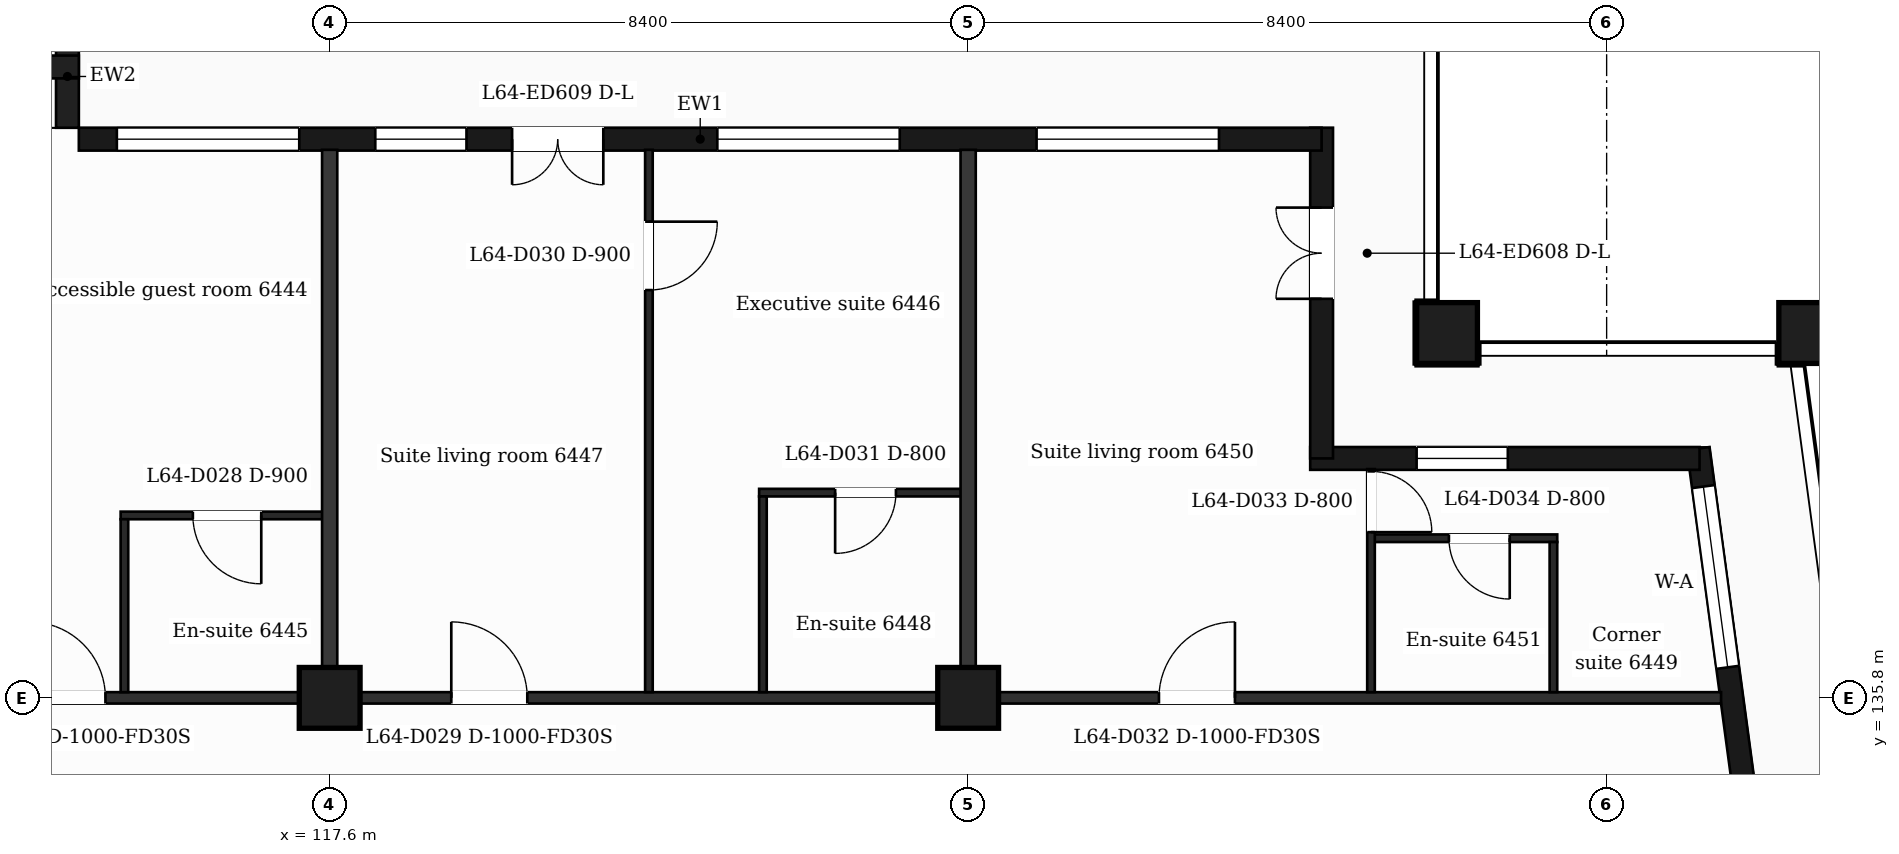
"""IFC4 building model, lengths in metres.
Left out: names, types, materials, properties, quantities, classifications, styles, units other than length and angle.
Written with IfcOpenShell. Run it as: python <this file> out.ifc"""

import sys

from ifc_helpers import new_model, si_unit, direction, frame, frame_2d, origin, origin_2d, place, context, subcontext, project, spatial, rectangle, extrude, element, fill, save


model = new_model("IFC4")
c1 = context("Model", 3, precision=1e-05, world=origin(), true_north=direction((0.0, 1.0)))
c2 = subcontext(c1, "Body", "Model", "MODEL_VIEW")
j1 = project(units=[si_unit("LENGTHUNIT", "METRE"), si_unit("PLANEANGLEUNIT", "RADIAN")], contexts=[c1])
p1 = place(None, origin())
s1 = spatial("IfcSite", under=j1, at=p1, CompositionType="ELEMENT")
p2 = place(p1, origin())
s2 = spatial("IfcBuilding", under=s1, at=p2, CompositionType="ELEMENT")
p3 = place(p2, frame((0.0, 0.0, 266.4)))
s3 = spatial("IfcBuildingStorey", under=s2, at=p3, CompositionType="ELEMENT", Elevation=266.4)
for number, where, z_axis, x_axis in (
    (1, (132.3, 140.6, 0.0), (0.0, 0.0, 1.0), (1.0, 0.0, 0.0)),
    (2, (137.065, 140.6, 0.0), (0.0, 0.0, 1.0), (1.0, 0.0, 0.0)),
    (3, (117.6, 135.8, 0.0), (0.0, 0.0, 1.0), (1.0, 0.0, 0.0)),
    (4, (126.0, 135.8, 0.0), (0.0, 0.0, 1.0), (1.0, 0.0, 0.0)),
):
    element("IfcColumn", number, at=place(p3, frame(where, z_axis=z_axis, x_axis=x_axis)), inside=s3, PredefinedType="COLUMN", context=c2, shape_type="SweptSolid", body=[
        extrude(rectangle(XDim=0.8, YDim=0.8, at=origin_2d()), origin(), (0.0, 0.0, 1.0), 3.7),
    ])
p4 = place(p3, frame((136.504, 132.4, 0.0), z_axis=(0.0, 0.0, 1.0), x_axis=(-0.133399697462, 0.99106231929, 0.0)))
e5 = element("IfcWall", 5, at=p4, inside=s3, PredefinedType="SOLIDWALL", context=c2, shape_type="SweptSolid", body=[
    extrude(rectangle(XDim=6.74, YDim=0.3, at=frame_2d((3.37, 0.0))), origin(), (0.0, 0.0, 1.0), 3.38),
])
p5 = place(p4, frame((1.115, 0.0, 0.0)))
e6 = element("IfcOpeningElement", 6, at=p5, cuts=e5, PredefinedType="OPENING", context=c2, shape_type="SweptSolid", body=[
    extrude(rectangle(XDim=1.2, YDim=2.4, at=frame_2d((0.6, 1.2))), frame((0.0, 0.16, 0.0), z_axis=(0.0, -1.0, 0.0), x_axis=(1.0, 0.0, 0.0)), (0.0, 0.0, 1.0), 0.32),
])
p6 = place(p4, frame((3.835, 0.0, 0.9)))
e7 = element("IfcOpeningElement", 7, at=p6, cuts=e5, PredefinedType="OPENING", context=c2, shape_type="SweptSolid", body=[
    extrude(rectangle(XDim=2.4, YDim=2.1, at=frame_2d((1.2, 1.05))), frame((0.0, 0.16, 0.0), z_axis=(0.0, -1.0, 0.0), x_axis=(1.0, 0.0, 0.0)), (0.0, 0.0, 1.0), 0.32),
])
p7 = place(p3, frame((135.623, 138.95, 0.0), z_axis=(0.0, 0.0, 1.0), x_axis=(-1.0, 0.0, 0.0)))
e8 = element("IfcWall", 8, at=p7, inside=s3, PredefinedType="SOLIDWALL", context=c2, shape_type="SweptSolid", body=[
    extrude(rectangle(XDim=5.123, YDim=0.3, at=frame_2d((2.561, 0.0))), origin(), (0.0, 0.0, 1.0), 3.38),
])
p8 = place(p7, frame((2.523, 0.0, 0.9)))
e9 = element("IfcOpeningElement", 9, at=p8, cuts=e8, PredefinedType="OPENING", context=c2, shape_type="SweptSolid", body=[
    extrude(rectangle(XDim=1.2, YDim=2.1, at=frame_2d((0.6, 1.05))), frame((0.0, 0.16, 0.0), z_axis=(0.0, -1.0, 0.0), x_axis=(1.0, 0.0, 0.0)), (0.0, 0.0, 1.0), 0.32),
])
p9 = place(p3, frame((130.65, 138.95, 0.0), z_axis=(0.0, 0.0, 1.0), x_axis=(0.0, 1.0, 0.0)))
e10 = element("IfcWall", 10, at=p9, inside=s3, PredefinedType="SOLIDWALL", context=c2, shape_type="SweptSolid", body=[
    extrude(rectangle(XDim=4.35, YDim=0.3, at=frame_2d((2.175, 0.0))), origin(), (0.0, 0.0, 1.0), 3.38),
])
p10 = place(p9, frame((2.1, 0.0, 0.0)))
e11 = element("IfcOpeningElement", 11, at=p10, cuts=e10, PredefinedType="OPENING", context=c2, shape_type="SweptSolid", body=[
    extrude(rectangle(XDim=1.2, YDim=2.4, at=frame_2d((0.6, 1.2))), frame((0.0, 0.16, 0.0), z_axis=(0.0, -1.0, 0.0), x_axis=(1.0, 0.0, 0.0)), (0.0, 0.0, 1.0), 0.32),
])
p11 = place(p3, frame((130.65, 143.15, 0.0), z_axis=(0.0, 0.0, 1.0), x_axis=(-1.0, 0.0, 0.0)))
e12 = element("IfcWall", 12, at=p11, inside=s3, PredefinedType="SOLIDWALL", context=c2, shape_type="SweptSolid", body=[
    extrude(rectangle(XDim=16.35, YDim=0.3, at=frame_2d((8.175, 0.0))), origin(), (0.0, 0.0, 1.0), 3.38),
])
p12 = place(p11, frame((1.35, 0.0, 0.9)))
e13 = element("IfcOpeningElement", 13, at=p12, cuts=e12, PredefinedType="OPENING", context=c2, shape_type="SweptSolid", body=[
    extrude(rectangle(XDim=2.4, YDim=2.1, at=frame_2d((1.2, 1.05))), frame((0.0, 0.16, 0.0), z_axis=(0.0, -1.0, 0.0), x_axis=(1.0, 0.0, 0.0)), (0.0, 0.0, 1.0), 0.32),
])
p13 = place(p11, frame((5.55, 0.0, 0.9)))
e14 = element("IfcOpeningElement", 14, at=p13, cuts=e12, PredefinedType="OPENING", context=c2, shape_type="SweptSolid", body=[
    extrude(rectangle(XDim=2.4, YDim=2.1, at=frame_2d((1.2, 1.05))), frame((0.0, 0.16, 0.0), z_axis=(0.0, -1.0, 0.0), x_axis=(1.0, 0.0, 0.0)), (0.0, 0.0, 1.0), 0.32),
])
p14 = place(p11, frame((9.45, 0.0, 0.0)))
e15 = element("IfcOpeningElement", 15, at=p14, cuts=e12, PredefinedType="OPENING", context=c2, shape_type="SweptSolid", body=[
    extrude(rectangle(XDim=1.2, YDim=2.4, at=frame_2d((0.6, 1.2))), frame((0.0, 0.16, 0.0), z_axis=(0.0, -1.0, 0.0), x_axis=(1.0, 0.0, 0.0)), (0.0, 0.0, 1.0), 0.32),
])
p15 = place(p11, frame((11.25, 0.0, 0.9)))
e16 = element("IfcOpeningElement", 16, at=p15, cuts=e12, PredefinedType="OPENING", context=c2, shape_type="SweptSolid", body=[
    extrude(rectangle(XDim=1.2, YDim=2.1, at=frame_2d((0.6, 1.05))), frame((0.0, 0.16, 0.0), z_axis=(0.0, -1.0, 0.0), x_axis=(1.0, 0.0, 0.0)), (0.0, 0.0, 1.0), 0.32),
])
p16 = place(p11, frame((13.45, 0.0, 0.9)))
e17 = element("IfcOpeningElement", 17, at=p16, cuts=e12, PredefinedType="OPENING", context=c2, shape_type="SweptSolid", body=[
    extrude(rectangle(XDim=2.4, YDim=2.1, at=frame_2d((1.2, 1.05))), frame((0.0, 0.16, 0.0), z_axis=(0.0, -1.0, 0.0), x_axis=(1.0, 0.0, 0.0)), (0.0, 0.0, 1.0), 0.32),
])
p17 = place(p3, frame((114.15, 143.3, 0.0), z_axis=(0.0, 0.0, 1.0), x_axis=(0.0, 1.0, 0.0)))
e18 = element("IfcWall", 18, at=p17, inside=s3, PredefinedType="SOLIDWALL", context=c2, shape_type="SweptSolid", body=[
    extrude(rectangle(XDim=1.35, YDim=0.3, at=frame_2d((0.675, 0.0))), origin(), (0.0, 0.0, 1.0), 3.38),
])
p18 = place(p3, frame((114.3, 144.1, 0.0), z_axis=(0.0, 0.0, 1.0), x_axis=(-1.0, 0.0, 0.0)))
e19 = element("IfcWall", 19, at=p18, inside=s3, PredefinedType="SOLIDWALL", context=c2, shape_type="SweptSolid", body=[
    extrude(rectangle(XDim=3.9, YDim=0.3, at=frame_2d((1.95, 0.0))), origin(), (0.0, 0.0, 1.0), 3.38),
])
p19 = place(p18, frame((1.35, 0.0, 0.0)))
e20 = element("IfcOpeningElement", 20, at=p19, cuts=e19, PredefinedType="OPENING", context=c2, shape_type="SweptSolid", body=[
    extrude(rectangle(XDim=1.2, YDim=2.4, at=frame_2d((0.6, 1.2))), frame((0.0, 0.16, 0.0), z_axis=(0.0, -1.0, 0.0), x_axis=(1.0, 0.0, 0.0)), (0.0, 0.0, 1.0), 0.32),
])
p20 = place(p3, frame((90.895, 135.8, 0.0), z_axis=(0.0, 0.0, 1.0), x_axis=(1.0, 0.0, 0.0)))
e21 = element("IfcWall", 21, at=p20, inside=s3, PredefinedType="PARTITIONING", context=c2, shape_type="SweptSolid", body=[
    extrude(rectangle(XDim=45.011, YDim=0.15, at=frame_2d((22.505, 0.0))), origin(), (0.0, 0.0, 1.0), 3.38),
])
p21 = place(p20, frame((8.005, 0.0, 0.0)))
e22 = element("IfcOpeningElement", 22, at=p21, cuts=e21, PredefinedType="OPENING", context=c2, shape_type="SweptSolid", body=[
    extrude(rectangle(XDim=1.0, YDim=2.1, at=frame_2d((0.5, 1.05))), frame((0.0, 0.085, 0.0), z_axis=(0.0, -1.0, 0.0), x_axis=(1.0, 0.0, 0.0)), (0.0, 0.0, 1.0), 0.17),
])
p22 = place(p20, frame((11.93, 0.0, 0.0)))
e23 = element("IfcOpeningElement", 23, at=p22, cuts=e21, PredefinedType="OPENING", context=c2, shape_type="SweptSolid", body=[
    extrude(rectangle(XDim=1.0, YDim=2.1, at=frame_2d((0.5, 1.05))), frame((0.0, 0.085, 0.0), z_axis=(0.0, -1.0, 0.0), x_axis=(1.0, 0.0, 0.0)), (0.0, 0.0, 1.0), 0.17),
])
p23 = place(p20, frame((22.755, 0.0, 0.0)))
e24 = element("IfcOpeningElement", 24, at=p23, cuts=e21, PredefinedType="OPENING", context=c2, shape_type="SweptSolid", body=[
    extrude(rectangle(XDim=1.0, YDim=2.1, at=frame_2d((0.5, 1.05))), frame((0.0, 0.085, 0.0), z_axis=(0.0, -1.0, 0.0), x_axis=(1.0, 0.0, 0.0)), (0.0, 0.0, 1.0), 0.17),
])
p24 = place(p20, frame((28.305, 0.0, 0.0)))
e25 = element("IfcOpeningElement", 25, at=p24, cuts=e21, PredefinedType="OPENING", context=c2, shape_type="SweptSolid", body=[
    extrude(rectangle(XDim=1.0, YDim=2.1, at=frame_2d((0.5, 1.05))), frame((0.0, 0.085, 0.0), z_axis=(0.0, -1.0, 0.0), x_axis=(1.0, 0.0, 0.0)), (0.0, 0.0, 1.0), 0.17),
])
p25 = place(p20, frame((37.615, 0.0, 0.0)))
e26 = element("IfcOpeningElement", 26, at=p25, cuts=e21, PredefinedType="OPENING", context=c2, shape_type="SweptSolid", body=[
    extrude(rectangle(XDim=1.0, YDim=2.1, at=frame_2d((0.5, 1.05))), frame((0.0, 0.085, 0.0), z_axis=(0.0, -1.0, 0.0), x_axis=(1.0, 0.0, 0.0)), (0.0, 0.0, 1.0), 0.17),
])
p26 = place(p3, frame((131.3, 137.9, 0.0), z_axis=(0.0, 0.0, 1.0), x_axis=(1.0, 0.0, 0.0)))
e27 = element("IfcWall", 27, at=p26, inside=s3, PredefinedType="PARTITIONING", context=c2, shape_type="SweptSolid", body=[
    extrude(rectangle(XDim=2.45, YDim=0.1, at=frame_2d((1.225, 0.0))), origin(), (0.0, 0.0, 1.0), 3.38),
])
p27 = place(p26, frame((1.025, 0.0, 0.0)))
e28 = element("IfcOpeningElement", 28, at=p27, cuts=e27, PredefinedType="OPENING", context=c2, shape_type="SweptSolid", body=[
    extrude(rectangle(XDim=0.8, YDim=2.1, at=frame_2d((0.4, 1.05))), frame((0.0, 0.06, 0.0), z_axis=(0.0, -1.0, 0.0), x_axis=(1.0, 0.0, 0.0)), (0.0, 0.0, 1.0), 0.12),
])
p28 = place(p3, frame((114.85, 138.2, 0.0), z_axis=(0.0, 0.0, 1.0), x_axis=(1.0, 0.0, 0.0)))
e29 = element("IfcWall", 29, at=p28, inside=s3, PredefinedType="PARTITIONING", context=c2, shape_type="SweptSolid", body=[
    extrude(rectangle(XDim=2.75, YDim=0.1, at=frame_2d((1.375, 0.0))), origin(), (0.0, 0.0, 1.0), 3.38),
])
p29 = place(p28, frame((0.95, 0.0, 0.0)))
e30 = element("IfcOpeningElement", 30, at=p29, cuts=e29, PredefinedType="OPENING", context=c2, shape_type="SweptSolid", body=[
    extrude(rectangle(XDim=0.9, YDim=2.1, at=frame_2d((0.45, 1.05))), frame((0.0, 0.06, 0.0), z_axis=(0.0, -1.0, 0.0), x_axis=(1.0, 0.0, 0.0)), (0.0, 0.0, 1.0), 0.12),
])
p30 = place(p3, frame((123.25, 138.5, 0.0), z_axis=(0.0, 0.0, 1.0), x_axis=(1.0, 0.0, 0.0)))
e31 = element("IfcWall", 31, at=p30, inside=s3, PredefinedType="PARTITIONING", context=c2, shape_type="SweptSolid", body=[
    extrude(rectangle(XDim=2.75, YDim=0.1, at=frame_2d((1.375, 0.0))), origin(), (0.0, 0.0, 1.0), 3.38),
])
p31 = place(p30, frame((1.0, 0.0, 0.0)))
e32 = element("IfcOpeningElement", 32, at=p31, cuts=e31, PredefinedType="OPENING", context=c2, shape_type="SweptSolid", body=[
    extrude(rectangle(XDim=0.8, YDim=2.1, at=frame_2d((0.4, 1.05))), frame((0.0, 0.06, 0.0), z_axis=(0.0, -1.0, 0.0), x_axis=(1.0, 0.0, 0.0)), (0.0, 0.0, 1.0), 0.12),
])
p32 = place(p3, frame((114.9, 135.875, 0.0), z_axis=(0.0, 0.0, 1.0), x_axis=(0.0, 1.0, 0.0)))
e33 = element("IfcWall", 33, at=p32, inside=s3, PredefinedType="PARTITIONING", context=c2, shape_type="SweptSolid", body=[
    extrude(rectangle(XDim=2.275, YDim=0.1, at=frame_2d((1.137, 0.0))), origin(), (0.0, 0.0, 1.0), 3.38),
])
p33 = place(p3, frame((117.6, 135.875, 0.0), z_axis=(0.0, 0.0, 1.0), x_axis=(0.0, 1.0, 0.0)))
e34 = element("IfcWall", 34, at=p33, inside=s3, PredefinedType="PARTITIONING", context=c2, shape_type="SweptSolid", body=[
    extrude(rectangle(XDim=7.135, YDim=0.2, at=frame_2d((3.567, 0.0))), origin(), (0.0, 0.0, 1.0), 3.38),
])
p34 = place(p3, frame((121.8, 135.875, 0.0), z_axis=(0.0, 0.0, 1.0), x_axis=(0.0, 1.0, 0.0)))
e35 = element("IfcWall", 35, at=p34, inside=s3, PredefinedType="PARTITIONING", context=c2, shape_type="SweptSolid", body=[
    extrude(rectangle(XDim=7.135, YDim=0.1, at=frame_2d((3.567, 0.0))), origin(), (0.0, 0.0, 1.0), 3.38),
])
p35 = place(p34, frame((5.29, 0.0, 0.0)))
e36 = element("IfcOpeningElement", 36, at=p35, cuts=e35, PredefinedType="OPENING", context=c2, shape_type="SweptSolid", body=[
    extrude(rectangle(XDim=0.9, YDim=2.1, at=frame_2d((0.45, 1.05))), frame((0.0, 0.06, 0.0), z_axis=(0.0, -1.0, 0.0), x_axis=(1.0, 0.0, 0.0)), (0.0, 0.0, 1.0), 0.12),
])
p36 = place(p3, frame((123.3, 135.875, 0.0), z_axis=(0.0, 0.0, 1.0), x_axis=(0.0, 1.0, 0.0)))
e37 = element("IfcWall", 37, at=p36, inside=s3, PredefinedType="PARTITIONING", context=c2, shape_type="SweptSolid", body=[
    extrude(rectangle(XDim=2.575, YDim=0.1, at=frame_2d((1.288, 0.0))), origin(), (0.0, 0.0, 1.0), 3.38),
])
p37 = place(p3, frame((126.0, 135.875, 0.0), z_axis=(0.0, 0.0, 1.0), x_axis=(0.0, 1.0, 0.0)))
e38 = element("IfcWall", 38, at=p37, inside=s3, PredefinedType="PARTITIONING", context=c2, shape_type="SweptSolid", body=[
    extrude(rectangle(XDim=7.135, YDim=0.2, at=frame_2d((3.567, 0.0))), origin(), (0.0, 0.0, 1.0), 3.38),
])
p38 = place(p3, frame((131.3, 135.875, 0.0), z_axis=(0.0, 0.0, 1.0), x_axis=(0.0, 1.0, 0.0)))
e39 = element("IfcWall", 39, at=p38, inside=s3, PredefinedType="PARTITIONING", context=c2, shape_type="SweptSolid", body=[
    extrude(rectangle(XDim=2.935, YDim=0.1, at=frame_2d((1.468, 0.0))), origin(), (0.0, 0.0, 1.0), 3.38),
])
p39 = place(p38, frame((2.105, 0.0, 0.0)))
e40 = element("IfcOpeningElement", 40, at=p39, cuts=e39, PredefinedType="OPENING", context=c2, shape_type="SweptSolid", body=[
    extrude(rectangle(XDim=0.8, YDim=2.1, at=frame_2d((0.4, 1.05))), frame((0.0, 0.06, 0.0), z_axis=(0.0, -1.0, 0.0), x_axis=(1.0, 0.0, 0.0)), (0.0, 0.0, 1.0), 0.12),
])
p40 = place(p3, frame((133.7, 135.875, 0.0), z_axis=(0.0, 0.0, 1.0), x_axis=(0.0, 1.0, 0.0)))
e41 = element("IfcWall", 41, at=p40, inside=s3, PredefinedType="PARTITIONING", context=c2, shape_type="SweptSolid", body=[
    extrude(rectangle(XDim=1.975, YDim=0.1, at=frame_2d((0.988, 0.0))), origin(), (0.0, 0.0, 1.0), 3.38),
])
p41 = place(p6, origin())
e42 = element("IfcWindow", 42, at=p41, inside=s3, PartitioningType="SINGLE_PANEL", PredefinedType="WINDOW", context=c2, shape_type="SweptSolid", body=[
    extrude(rectangle(XDim=2.4, YDim=2.1, at=frame_2d((1.2, 1.05))), frame((0.0, 0.03, 0.0), z_axis=(0.0, -1.0, 0.0), x_axis=(1.0, 0.0, 0.0)), (0.0, 0.0, 1.0), 0.06),
])
fill(e7, e42)
p42 = place(p8, origin())
e43 = element("IfcWindow", 43, at=p42, inside=s3, PartitioningType="SINGLE_PANEL", PredefinedType="WINDOW", context=c2, shape_type="SweptSolid", body=[
    extrude(rectangle(XDim=1.2, YDim=2.1, at=frame_2d((0.6, 1.05))), frame((0.0, 0.03, 0.0), z_axis=(0.0, -1.0, 0.0), x_axis=(1.0, 0.0, 0.0)), (0.0, 0.0, 1.0), 0.06),
])
fill(e9, e43)
p43 = place(p10, origin())
e44 = element("IfcDoor", 44, at=p43, inside=s3, OperationType="DOUBLE_DOOR_SINGLE_SWING", PredefinedType="DOOR", context=c2, shape_type="SweptSolid", body=[
    extrude(rectangle(XDim=1.2, YDim=2.4, at=frame_2d((0.6, 1.2))), frame((0.0, 0.025, 0.0), z_axis=(0.0, -1.0, 0.0), x_axis=(1.0, 0.0, 0.0)), (0.0, 0.0, 1.0), 0.05),
])
fill(e11, e44)
p44 = place(p12, origin())
e45 = element("IfcWindow", 45, at=p44, inside=s3, PartitioningType="SINGLE_PANEL", PredefinedType="WINDOW", context=c2, shape_type="SweptSolid", body=[
    extrude(rectangle(XDim=2.4, YDim=2.1, at=frame_2d((1.2, 1.05))), frame((0.0, 0.03, 0.0), z_axis=(0.0, -1.0, 0.0), x_axis=(1.0, 0.0, 0.0)), (0.0, 0.0, 1.0), 0.06),
])
fill(e13, e45)
p45 = place(p13, origin())
e46 = element("IfcWindow", 46, at=p45, inside=s3, PartitioningType="SINGLE_PANEL", PredefinedType="WINDOW", context=c2, shape_type="SweptSolid", body=[
    extrude(rectangle(XDim=2.4, YDim=2.1, at=frame_2d((1.2, 1.05))), frame((0.0, 0.03, 0.0), z_axis=(0.0, -1.0, 0.0), x_axis=(1.0, 0.0, 0.0)), (0.0, 0.0, 1.0), 0.06),
])
fill(e14, e46)
p46 = place(p14, origin())
e47 = element("IfcDoor", 47, at=p46, inside=s3, OperationType="DOUBLE_DOOR_SINGLE_SWING", PredefinedType="DOOR", context=c2, shape_type="SweptSolid", body=[
    extrude(rectangle(XDim=1.2, YDim=2.4, at=frame_2d((0.6, 1.2))), frame((0.0, 0.025, 0.0), z_axis=(0.0, -1.0, 0.0), x_axis=(1.0, 0.0, 0.0)), (0.0, 0.0, 1.0), 0.05),
])
fill(e15, e47)
p47 = place(p15, origin())
e48 = element("IfcWindow", 48, at=p47, inside=s3, PartitioningType="SINGLE_PANEL", PredefinedType="WINDOW", context=c2, shape_type="SweptSolid", body=[
    extrude(rectangle(XDim=1.2, YDim=2.1, at=frame_2d((0.6, 1.05))), frame((0.0, 0.03, 0.0), z_axis=(0.0, -1.0, 0.0), x_axis=(1.0, 0.0, 0.0)), (0.0, 0.0, 1.0), 0.06),
])
fill(e16, e48)
p48 = place(p16, origin())
e49 = element("IfcWindow", 49, at=p48, inside=s3, PartitioningType="SINGLE_PANEL", PredefinedType="WINDOW", context=c2, shape_type="SweptSolid", body=[
    extrude(rectangle(XDim=2.4, YDim=2.1, at=frame_2d((1.2, 1.05))), frame((0.0, 0.03, 0.0), z_axis=(0.0, -1.0, 0.0), x_axis=(1.0, 0.0, 0.0)), (0.0, 0.0, 1.0), 0.06),
])
fill(e17, e49)
p49 = place(p23, origin())
e50 = element("IfcDoor", 50, at=p49, inside=s3, OperationType="SINGLE_SWING_LEFT", PredefinedType="DOOR", context=c2, shape_type="SweptSolid", body=[
    extrude(rectangle(XDim=1.0, YDim=2.1, at=frame_2d((0.5, 1.05))), frame((0.0, 0.025, 0.0), z_axis=(0.0, -1.0, 0.0), x_axis=(1.0, 0.0, 0.0)), (0.0, 0.0, 1.0), 0.05),
])
fill(e24, e50)
p50 = place(p29, origin())
e51 = element("IfcDoor", 51, at=p50, inside=s3, OperationType="SINGLE_SWING_RIGHT", PredefinedType="DOOR", context=c2, shape_type="SweptSolid", body=[
    extrude(rectangle(XDim=0.9, YDim=2.1, at=frame_2d((0.45, 1.05))), frame((0.0, 0.025, 0.0), z_axis=(0.0, -1.0, 0.0), x_axis=(1.0, 0.0, 0.0)), (0.0, 0.0, 1.0), 0.05),
])
fill(e30, e51)
p51 = place(p24, origin())
e52 = element("IfcDoor", 52, at=p51, inside=s3, OperationType="SINGLE_SWING_LEFT", PredefinedType="DOOR", context=c2, shape_type="SweptSolid", body=[
    extrude(rectangle(XDim=1.0, YDim=2.1, at=frame_2d((0.5, 1.05))), frame((0.0, 0.025, 0.0), z_axis=(0.0, -1.0, 0.0), x_axis=(1.0, 0.0, 0.0)), (0.0, 0.0, 1.0), 0.05),
])
fill(e25, e52)
p52 = place(p35, origin())
e53 = element("IfcDoor", 53, at=p52, inside=s3, OperationType="SINGLE_SWING_RIGHT", PredefinedType="DOOR", context=c2, shape_type="SweptSolid", body=[
    extrude(rectangle(XDim=0.9, YDim=2.1, at=frame_2d((0.45, 1.05))), frame((0.0, 0.025, 0.0), z_axis=(0.0, -1.0, 0.0), x_axis=(1.0, 0.0, 0.0)), (0.0, 0.0, 1.0), 0.05),
])
fill(e36, e53)
p53 = place(p31, origin())
e54 = element("IfcDoor", 54, at=p53, inside=s3, OperationType="SINGLE_SWING_LEFT", PredefinedType="DOOR", context=c2, shape_type="SweptSolid", body=[
    extrude(rectangle(XDim=0.8, YDim=2.1, at=frame_2d((0.4, 1.05))), frame((0.0, 0.025, 0.0), z_axis=(0.0, -1.0, 0.0), x_axis=(1.0, 0.0, 0.0)), (0.0, 0.0, 1.0), 0.05),
])
fill(e32, e54)
p54 = place(p25, origin())
e55 = element("IfcDoor", 55, at=p54, inside=s3, OperationType="SINGLE_SWING_RIGHT", PredefinedType="DOOR", context=c2, shape_type="SweptSolid", body=[
    extrude(rectangle(XDim=1.0, YDim=2.1, at=frame_2d((0.5, 1.05))), frame((0.0, 0.025, 0.0), z_axis=(0.0, -1.0, 0.0), x_axis=(1.0, 0.0, 0.0)), (0.0, 0.0, 1.0), 0.05),
])
fill(e26, e55)
p55 = place(p39, origin())
e56 = element("IfcDoor", 56, at=p55, inside=s3, OperationType="SINGLE_SWING_LEFT", PredefinedType="DOOR", context=c2, shape_type="SweptSolid", body=[
    extrude(rectangle(XDim=0.8, YDim=2.1, at=frame_2d((0.4, 1.05))), frame((0.0, 0.025, 0.0), z_axis=(0.0, -1.0, 0.0), x_axis=(1.0, 0.0, 0.0)), (0.0, 0.0, 1.0), 0.05),
])
fill(e40, e56)
p56 = place(p27, origin())
e57 = element("IfcDoor", 57, at=p56, inside=s3, OperationType="SINGLE_SWING_RIGHT", PredefinedType="DOOR", context=c2, shape_type="SweptSolid", body=[
    extrude(rectangle(XDim=0.8, YDim=2.1, at=frame_2d((0.4, 1.05))), frame((0.0, 0.025, 0.0), z_axis=(0.0, -1.0, 0.0), x_axis=(1.0, 0.0, 0.0)), (0.0, 0.0, 1.0), 0.05),
])
fill(e28, e57)
save(model, sys.argv[1])
